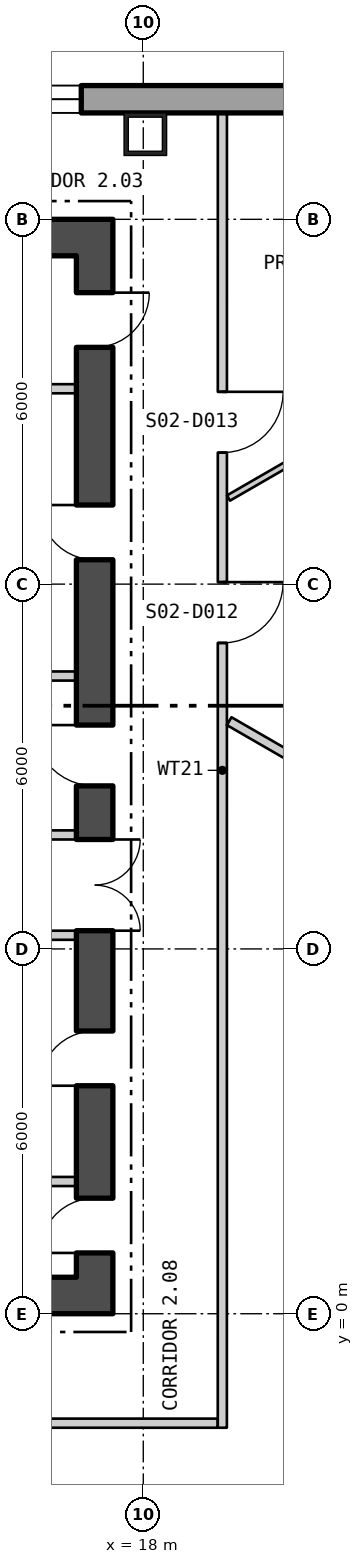
"""IFC4 building model, lengths in metres.
Left out: names, types, materials, properties, quantities, classifications, styles, units other than length and angle.
Written with IfcOpenShell. Run it as: python <this file> out.ifc"""

import sys

from ifc_helpers import new_model, si_unit, direction, frame, frame_2d, origin, origin_2d, place, context, subcontext, project, spatial, polyline, rectangle, hollow_rectangle, outline, extrude, element, fill, save


model = new_model("IFC4")
c1 = context("Model", 3, precision=1e-05, world=origin(), true_north=direction((0.0, 1.0)))
c2 = subcontext(c1, "Body", "Model", "MODEL_VIEW")
j1 = project(units=[si_unit("LENGTHUNIT", "METRE"), si_unit("PLANEANGLEUNIT", "RADIAN")], contexts=[c1])
p1 = place(None, origin())
s1 = spatial("IfcSite", under=j1, at=p1, CompositionType="ELEMENT")
p2 = place(p1, origin())
s2 = spatial("IfcBuilding", under=s1, at=p2, CompositionType="ELEMENT")
p3 = place(p2, frame((0.0, 0.0, 33.3)))
s3 = spatial("IfcBuildingStorey", under=s2, at=p3, CompositionType="ELEMENT", Elevation=33.3)
p4 = place(p3, frame((18.034, 19.4, 0.0), z_axis=(0.0, 0.0, 1.0), x_axis=(-1.0, 0.0, 0.0)))
e1 = element("IfcColumn", 1, at=p4, inside=s3, PredefinedType="COLUMN", context=c2, shape_type="SweptSolid", body=[
    extrude(hollow_rectangle(XDim=0.7, YDim=0.7, WallThickness=0.07, at=origin_2d()), origin(), (0.0, 0.0, 1.0), 4.5),
])
p5 = place(p3, frame((22.875, 19.975, -0.4), z_axis=(0.0, 0.0, 1.0), x_axis=(-1.0, 0.0, 0.0)))
e2 = element("IfcWall", 2, at=p5, inside=s3, PredefinedType="SOLIDWALL", context=c2, shape_type="SweptSolid", body=[
    extrude(outline(polyline([(-0.13, -0.225), (45.88, -0.225), (45.62, 0.225), (0.13, 0.225), (-0.13, -0.225)])), origin(), (0.0, 0.0, 1.0), 4.5),
])
p6 = place(p5, frame((5.895, 0.0, 1.3)))
e3 = element("IfcOpeningElement", 3, at=p6, cuts=e2, PredefinedType="OPENING", context=c2, shape_type="SweptSolid", body=[
    extrude(rectangle(XDim=2.4, YDim=2.6, at=frame_2d((1.2, 1.3))), frame((0.0, 0.235, 0.0), z_axis=(0.0, -1.0, 0.0), x_axis=(1.0, 0.0, 0.0)), (0.0, 0.0, 1.0), 0.47),
])
p7 = place(p5, frame((10.403, 0.0, 1.3)))
e4 = element("IfcOpeningElement", 4, at=p7, cuts=e2, PredefinedType="OPENING", context=c2, shape_type="SweptSolid", body=[
    extrude(rectangle(XDim=2.4, YDim=2.6, at=frame_2d((1.2, 1.3))), frame((0.0, 0.235, 0.0), z_axis=(0.0, -1.0, 0.0), x_axis=(1.0, 0.0, 0.0)), (0.0, 0.0, 1.0), 0.47),
])
p8 = place(p5, frame((14.912, 0.0, 1.3)))
e5 = element("IfcOpeningElement", 5, at=p8, cuts=e2, PredefinedType="OPENING", context=c2, shape_type="SweptSolid", body=[
    extrude(rectangle(XDim=2.4, YDim=2.6, at=frame_2d((1.2, 1.3))), frame((0.0, 0.235, 0.0), z_axis=(0.0, -1.0, 0.0), x_axis=(1.0, 0.0, 0.0)), (0.0, 0.0, 1.0), 0.47),
])
p9 = place(p5, frame((19.421, 0.0, 1.3)))
e6 = element("IfcOpeningElement", 6, at=p9, cuts=e2, PredefinedType="OPENING", context=c2, shape_type="SweptSolid", body=[
    extrude(rectangle(XDim=2.4, YDim=2.6, at=frame_2d((1.2, 1.3))), frame((0.0, 0.235, 0.0), z_axis=(0.0, -1.0, 0.0), x_axis=(1.0, 0.0, 0.0)), (0.0, 0.0, 1.0), 0.47),
])
p10 = place(p5, frame((23.929, 0.0, 1.3)))
e7 = element("IfcOpeningElement", 7, at=p10, cuts=e2, PredefinedType="OPENING", context=c2, shape_type="SweptSolid", body=[
    extrude(rectangle(XDim=2.4, YDim=2.6, at=frame_2d((1.2, 1.3))), frame((0.0, 0.235, 0.0), z_axis=(0.0, -1.0, 0.0), x_axis=(1.0, 0.0, 0.0)), (0.0, 0.0, 1.0), 0.47),
])
p11 = place(p5, frame((28.438, 0.0, 1.3)))
e8 = element("IfcOpeningElement", 8, at=p11, cuts=e2, PredefinedType="OPENING", context=c2, shape_type="SweptSolid", body=[
    extrude(rectangle(XDim=2.4, YDim=2.6, at=frame_2d((1.2, 1.3))), frame((0.0, 0.235, 0.0), z_axis=(0.0, -1.0, 0.0), x_axis=(1.0, 0.0, 0.0)), (0.0, 0.0, 1.0), 0.47),
])
p12 = place(p5, frame((32.947, 0.0, 1.3)))
e9 = element("IfcOpeningElement", 9, at=p12, cuts=e2, PredefinedType="OPENING", context=c2, shape_type="SweptSolid", body=[
    extrude(rectangle(XDim=2.4, YDim=2.6, at=frame_2d((1.2, 1.3))), frame((0.0, 0.235, 0.0), z_axis=(0.0, -1.0, 0.0), x_axis=(1.0, 0.0, 0.0)), (0.0, 0.0, 1.0), 0.47),
])
p13 = place(p5, frame((37.455, 0.0, 1.3)))
e10 = element("IfcOpeningElement", 10, at=p13, cuts=e2, PredefinedType="OPENING", context=c2, shape_type="SweptSolid", body=[
    extrude(rectangle(XDim=2.4, YDim=2.6, at=frame_2d((1.2, 1.3))), frame((0.0, 0.235, 0.0), z_axis=(0.0, -1.0, 0.0), x_axis=(1.0, 0.0, 0.0)), (0.0, 0.0, 1.0), 0.47),
])
p14 = place(p3, frame((5.75, -29.605, -0.18), z_axis=(0.0, 0.0, 1.0), x_axis=(0.500000335318, 0.866025210188, 0.0)))
e11 = element("IfcWall", 11, at=p14, inside=s3, PredefinedType="SOLIDWALL", context=c2, shape_type="SweptSolid", body=[
    extrude(outline(polyline([(-0.13, -0.225), (45.88, -0.225), (45.62, 0.225), (0.13, 0.225), (-0.13, -0.225)])), origin(), (0.0, 0.0, 1.0), 4.28),
])
p15 = place(p14, frame((1.425, 0.0, 1.08)))
e12 = element("IfcOpeningElement", 12, at=p15, cuts=e11, PredefinedType="OPENING", context=c2, shape_type="SweptSolid", body=[
    extrude(rectangle(XDim=2.4, YDim=2.6, at=frame_2d((1.2, 1.3))), frame((0.0, 0.235, 0.0), z_axis=(0.0, -1.0, 0.0), x_axis=(1.0, 0.0, 0.0)), (0.0, 0.0, 1.0), 0.47),
])
p16 = place(p14, frame((5.895, 0.0, 1.08)))
e13 = element("IfcOpeningElement", 13, at=p16, cuts=e11, PredefinedType="OPENING", context=c2, shape_type="SweptSolid", body=[
    extrude(rectangle(XDim=2.4, YDim=2.6, at=frame_2d((1.2, 1.3))), frame((0.0, 0.235, 0.0), z_axis=(0.0, -1.0, 0.0), x_axis=(1.0, 0.0, 0.0)), (0.0, 0.0, 1.0), 0.47),
])
p17 = place(p14, frame((10.403, 0.0, 1.08)))
e14 = element("IfcOpeningElement", 14, at=p17, cuts=e11, PredefinedType="OPENING", context=c2, shape_type="SweptSolid", body=[
    extrude(rectangle(XDim=2.4, YDim=2.6, at=frame_2d((1.2, 1.3))), frame((0.0, 0.235, 0.0), z_axis=(0.0, -1.0, 0.0), x_axis=(1.0, 0.0, 0.0)), (0.0, 0.0, 1.0), 0.47),
])
p18 = place(p14, frame((14.912, 0.0, 1.08)))
e15 = element("IfcOpeningElement", 15, at=p18, cuts=e11, PredefinedType="OPENING", context=c2, shape_type="SweptSolid", body=[
    extrude(rectangle(XDim=2.4, YDim=2.6, at=frame_2d((1.2, 1.3))), frame((0.0, 0.235, 0.0), z_axis=(0.0, -1.0, 0.0), x_axis=(1.0, 0.0, 0.0)), (0.0, 0.0, 1.0), 0.47),
])
p19 = place(p14, frame((19.421, 0.0, 1.08)))
e16 = element("IfcOpeningElement", 16, at=p19, cuts=e11, PredefinedType="OPENING", context=c2, shape_type="SweptSolid", body=[
    extrude(rectangle(XDim=2.4, YDim=2.6, at=frame_2d((1.2, 1.3))), frame((0.0, 0.235, 0.0), z_axis=(0.0, -1.0, 0.0), x_axis=(1.0, 0.0, 0.0)), (0.0, 0.0, 1.0), 0.47),
])
p20 = place(p14, frame((23.929, 0.0, 1.08)))
e17 = element("IfcOpeningElement", 17, at=p20, cuts=e11, PredefinedType="OPENING", context=c2, shape_type="SweptSolid", body=[
    extrude(rectangle(XDim=2.4, YDim=2.6, at=frame_2d((1.2, 1.3))), frame((0.0, 0.235, 0.0), z_axis=(0.0, -1.0, 0.0), x_axis=(1.0, 0.0, 0.0)), (0.0, 0.0, 1.0), 0.47),
])
p21 = place(p14, frame((28.438, 0.0, 1.08)))
e18 = element("IfcOpeningElement", 18, at=p21, cuts=e11, PredefinedType="OPENING", context=c2, shape_type="SweptSolid", body=[
    extrude(rectangle(XDim=2.4, YDim=2.6, at=frame_2d((1.2, 1.3))), frame((0.0, 0.235, 0.0), z_axis=(0.0, -1.0, 0.0), x_axis=(1.0, 0.0, 0.0)), (0.0, 0.0, 1.0), 0.47),
])
p22 = place(p14, frame((32.947, 0.0, 1.08)))
e19 = element("IfcOpeningElement", 19, at=p22, cuts=e11, PredefinedType="OPENING", context=c2, shape_type="SweptSolid", body=[
    extrude(rectangle(XDim=2.4, YDim=2.6, at=frame_2d((1.2, 1.3))), frame((0.0, 0.235, 0.0), z_axis=(0.0, -1.0, 0.0), x_axis=(1.0, 0.0, 0.0)), (0.0, 0.0, 1.0), 0.47),
])
p23 = place(p14, frame((37.455, 0.0, 1.08)))
e20 = element("IfcOpeningElement", 20, at=p23, cuts=e11, PredefinedType="OPENING", context=c2, shape_type="SweptSolid", body=[
    extrude(rectangle(XDim=2.4, YDim=2.6, at=frame_2d((1.2, 1.3))), frame((0.0, 0.235, 0.0), z_axis=(0.0, -1.0, 0.0), x_axis=(1.0, 0.0, 0.0)), (0.0, 0.0, 1.0), 0.47),
])
p24 = place(p14, frame((41.925, 0.0, 1.08)))
e21 = element("IfcOpeningElement", 21, at=p24, cuts=e11, PredefinedType="OPENING", context=c2, shape_type="SweptSolid", body=[
    extrude(rectangle(XDim=2.4, YDim=2.6, at=frame_2d((1.2, 1.3))), frame((0.0, 0.235, 0.0), z_axis=(0.0, -1.0, 0.0), x_axis=(1.0, 0.0, 0.0)), (0.0, 0.0, 1.0), 0.47),
])
p25 = place(p3, frame((-17.5, 0.3, 0.0), z_axis=(0.0, 0.0, 1.0), x_axis=(1.0, 0.0, 0.0)))
e22 = element("IfcWall", 22, at=p25, inside=s3, PredefinedType="SHEAR", context=c2, shape_type="SweptSolid", body=[
    extrude(rectangle(XDim=35.0, YDim=0.6, at=frame_2d((17.5, 0.0))), origin(), (0.0, 0.0, 1.0), 4.3),
])
p26 = place(p25, frame((12.0, 0.0, 0.0)))
e23 = element("IfcOpeningElement", 23, at=p26, cuts=e22, PredefinedType="OPENING", context=c2, shape_type="SweptSolid", body=[
    extrude(rectangle(XDim=1.8, YDim=2.4, at=frame_2d((0.9, 1.2))), frame((0.0, 0.31, 0.0), z_axis=(0.0, -1.0, 0.0), x_axis=(1.0, 0.0, 0.0)), (0.0, 0.0, 1.0), 0.62),
])
p27 = place(p25, frame((22.0, 0.0, 0.0)))
e24 = element("IfcOpeningElement", 24, at=p27, cuts=e22, PredefinedType="OPENING", context=c2, shape_type="SweptSolid", body=[
    extrude(rectangle(XDim=1.8, YDim=2.4, at=frame_2d((0.9, 1.2))), frame((0.0, 0.31, 0.0), z_axis=(0.0, -1.0, 0.0), x_axis=(1.0, 0.0, 0.0)), (0.0, 0.0, 1.0), 0.62),
])
p28 = place(p3, frame((-17.5, 17.7, 0.0), z_axis=(0.0, 0.0, 1.0), x_axis=(1.0, 0.0, 0.0)))
e25 = element("IfcWall", 25, at=p28, inside=s3, PredefinedType="SHEAR", context=c2, shape_type="SweptSolid", body=[
    extrude(rectangle(XDim=35.0, YDim=0.6, at=frame_2d((17.5, 0.0))), origin(), (0.0, 0.0, 1.0), 4.3),
])
p29 = place(p3, frame((17.2, 0.6, 0.0), z_axis=(0.0, 0.0, 1.0), x_axis=(0.0, 1.0, 0.0)))
e26 = element("IfcWall", 26, at=p29, inside=s3, PredefinedType="SHEAR", context=c2, shape_type="SweptSolid", body=[
    extrude(rectangle(XDim=16.8, YDim=0.6, at=frame_2d((8.4, 0.0))), origin(), (0.0, 0.0, 1.0), 4.3),
])
p30 = place(p29, frame((5.7, 0.0, 0.0)))
e27 = element("IfcOpeningElement", 27, at=p30, cuts=e26, PredefinedType="OPENING", context=c2, shape_type="SweptSolid", body=[
    extrude(rectangle(XDim=1.5, YDim=2.1, at=frame_2d((0.75, 1.05))), frame((0.0, 0.31, 0.0), z_axis=(0.0, -1.0, 0.0), x_axis=(1.0, 0.0, 0.0)), (0.0, 0.0, 1.0), 0.62),
])
p31 = place(p29, frame((0.4, 0.0, 0.0)))
e28 = element("IfcOpeningElement", 28, at=p31, cuts=e26, PredefinedType="OPENING", context=c2, shape_type="SweptSolid", body=[
    extrude(rectangle(XDim=0.9, YDim=2.1, at=frame_2d((0.45, 1.05))), frame((0.0, 0.31, 0.0), z_axis=(0.0, -1.0, 0.0), x_axis=(1.0, 0.0, 0.0)), (0.0, 0.0, 1.0), 0.62),
])
p32 = place(p29, frame((3.15, 0.0, 0.0)))
e29 = element("IfcOpeningElement", 29, at=p32, cuts=e26, PredefinedType="OPENING", context=c2, shape_type="SweptSolid", body=[
    extrude(rectangle(XDim=0.9, YDim=2.1, at=frame_2d((0.45, 1.05))), frame((0.0, 0.31, 0.0), z_axis=(0.0, -1.0, 0.0), x_axis=(1.0, 0.0, 0.0)), (0.0, 0.0, 1.0), 0.62),
])
p33 = place(p29, frame((8.082, 0.0, 0.0)))
e30 = element("IfcOpeningElement", 30, at=p33, cuts=e26, PredefinedType="OPENING", context=c2, shape_type="SweptSolid", body=[
    extrude(rectangle(XDim=1.0, YDim=2.1, at=frame_2d((0.5, 1.05))), frame((0.0, 0.31, 0.0), z_axis=(0.0, -1.0, 0.0), x_axis=(1.0, 0.0, 0.0)), (0.0, 0.0, 1.0), 0.62),
])
p34 = place(p29, frame((11.801, 0.0, 0.0)))
e31 = element("IfcOpeningElement", 31, at=p34, cuts=e26, PredefinedType="OPENING", context=c2, shape_type="SweptSolid", body=[
    extrude(rectangle(XDim=0.9, YDim=2.1, at=frame_2d((0.45, 1.05))), frame((0.0, 0.31, 0.0), z_axis=(0.0, -1.0, 0.0), x_axis=(1.0, 0.0, 0.0)), (0.0, 0.0, 1.0), 0.62),
])
p35 = place(p29, frame((15.294, 0.0, 0.0)))
e32 = element("IfcOpeningElement", 32, at=p35, cuts=e26, PredefinedType="OPENING", context=c2, shape_type="SweptSolid", body=[
    extrude(rectangle(XDim=0.9, YDim=2.1, at=frame_2d((0.45, 1.05))), frame((0.0, 0.31, 0.0), z_axis=(0.0, -1.0, 0.0), x_axis=(1.0, 0.0, 0.0)), (0.0, 0.0, 1.0), 0.62),
])
for number, where, z_axis, x_axis in (
    (33, (14.5, 6.225, 0.0), (0.0, 0.0, 1.0), (1.0, 0.0, 0.0)),
    (34, (14.5, 7.875, 0.0), (0.0, 0.0, 1.0), (1.0, 0.0, 0.0)),
    (35, (14.5, 2.175, 0.0), (0.0, 0.0, 1.0), (1.0, 0.0, 0.0)),
    (36, (14.5, 10.489, 0.0), (0.0, 0.0, 1.0), (1.0, 0.0, 0.0)),
    (37, (14.5, 15.213, 0.0), (0.0, 0.0, 1.0), (1.0, 0.0, 0.0)),
):
    element("IfcWall", number, at=place(p3, frame(where, z_axis=z_axis, x_axis=x_axis)), inside=s3, PredefinedType="PARTITIONING", context=c2, shape_type="SweptSolid", body=[
        extrude(rectangle(XDim=2.4, YDim=0.15, at=frame_2d((1.2, 0.0))), origin(), (0.0, 0.0, 1.0), 4.3),
    ])
p36 = place(p3, frame((8.015, -1.8, 0.0), z_axis=(0.0, 0.0, 1.0), x_axis=(1.0, 0.0, 0.0)))
e38 = element("IfcWall", 38, at=p36, inside=s3, PredefinedType="PARTITIONING", context=c2, shape_type="SweptSolid", body=[
    extrude(rectangle(XDim=11.21, YDim=0.15, at=frame_2d((5.605, 0.0))), origin(), (0.0, 0.0, 1.0), 4.3),
])
p37 = place(p3, frame((19.3, -1.875, 0.0), z_axis=(0.0, 0.0, 1.0), x_axis=(4.6242775e-05, 0.999999998931, 0.0)))
e39 = element("IfcWall", 39, at=p37, inside=s3, PredefinedType="PARTITIONING", context=c2, shape_type="SweptSolid", body=[
    extrude(rectangle(XDim=21.625, YDim=0.15, at=frame_2d((10.812, 0.0))), origin(), (0.0, 0.0, 1.0), 4.3),
])
p38 = place(p37, frame((12.908, 0.0, 0.0)))
e40 = element("IfcOpeningElement", 40, at=p38, cuts=e39, PredefinedType="OPENING", context=c2, shape_type="SweptSolid", body=[
    extrude(rectangle(XDim=1.0, YDim=2.1, at=frame_2d((0.5, 1.05))), frame((0.0, 0.085, 0.0), z_axis=(0.0, -1.0, 0.0), x_axis=(1.0, 0.0, 0.0)), (0.0, 0.0, 1.0), 0.17),
])
p39 = place(p37, frame((16.038, 0.0, 0.0)))
e41 = element("IfcOpeningElement", 41, at=p39, cuts=e39, PredefinedType="OPENING", context=c2, shape_type="SweptSolid", body=[
    extrude(rectangle(XDim=1.0, YDim=2.1, at=frame_2d((0.5, 1.05))), frame((0.0, 0.085, 0.0), z_axis=(0.0, -1.0, 0.0), x_axis=(1.0, 0.0, 0.0)), (0.0, 0.0, 1.0), 0.17),
])
p40 = place(p3, frame((19.401, 13.416, 0.0), z_axis=(0.0, 0.0, 1.0), x_axis=(0.866108468144, 0.499856100702, 0.0)))
e42 = element("IfcWall", 42, at=p40, inside=s3, PredefinedType="PARTITIONING", context=c2, shape_type="SweptSolid", body=[
    extrude(rectangle(XDim=5.614, YDim=0.1, at=frame_2d((2.807, 0.0))), origin(), (0.0, 0.0, 1.0), 4.3),
])
p41 = place(p3, frame((19.413, 9.746, 0.0), z_axis=(0.0, 0.0, 1.0), x_axis=(0.865976502062, -0.500084690704, 0.0)))
e43 = element("IfcWall", 43, at=p41, inside=s3, PredefinedType="PARTITIONING", context=c2, shape_type="SweptSolid", body=[
    extrude(rectangle(XDim=7.169, YDim=0.15, at=frame_2d((3.584, 0.0))), origin(), (0.0, 0.0, 1.0), 4.3),
])
p42 = place(p6, origin())
e44 = element("IfcWindow", 44, at=p42, inside=s3, PartitioningType="SINGLE_PANEL", PredefinedType="WINDOW", context=c2, shape_type="SweptSolid", body=[
    extrude(rectangle(XDim=2.4, YDim=2.6, at=frame_2d((1.2, 1.3))), frame((0.0, 0.105, 0.0), z_axis=(0.0, -1.0, 0.0), x_axis=(1.0, 0.0, 0.0)), (0.0, 0.0, 1.0), 0.06),
])
fill(e3, e44)
p43 = place(p30, origin())
e45 = element("IfcDoor", 45, at=p43, inside=s3, OperationType="DOUBLE_DOOR_SINGLE_SWING", PredefinedType="DOOR", context=c2, shape_type="SweptSolid", body=[
    extrude(rectangle(XDim=1.5, YDim=2.1, at=frame_2d((0.75, 1.05))), frame((0.0, 0.025, 0.0), z_axis=(0.0, -1.0, 0.0), x_axis=(1.0, 0.0, 0.0)), (0.0, 0.0, 1.0), 0.05),
])
fill(e27, e45)
p44 = place(p31, origin())
e46 = element("IfcDoor", 46, at=p44, inside=s3, OperationType="SINGLE_SWING_RIGHT", PredefinedType="DOOR", context=c2, shape_type="SweptSolid", body=[
    extrude(rectangle(XDim=0.9, YDim=2.1, at=frame_2d((0.45, 1.05))), frame((0.0, 0.025, 0.0), z_axis=(0.0, -1.0, 0.0), x_axis=(1.0, 0.0, 0.0)), (0.0, 0.0, 1.0), 0.05),
])
fill(e28, e46)
p45 = place(p32, origin())
e47 = element("IfcDoor", 47, at=p45, inside=s3, OperationType="SINGLE_SWING_RIGHT", PredefinedType="DOOR", context=c2, shape_type="SweptSolid", body=[
    extrude(rectangle(XDim=0.9, YDim=2.1, at=frame_2d((0.45, 1.05))), frame((0.0, 0.025, 0.0), z_axis=(0.0, -1.0, 0.0), x_axis=(1.0, 0.0, 0.0)), (0.0, 0.0, 1.0), 0.05),
])
fill(e29, e47)
p46 = place(p33, origin())
e48 = element("IfcDoor", 48, at=p46, inside=s3, OperationType="SINGLE_SWING_LEFT", PredefinedType="DOOR", context=c2, shape_type="SweptSolid", body=[
    extrude(rectangle(XDim=1.0, YDim=2.1, at=frame_2d((0.5, 1.05))), frame((0.0, 0.025, 0.0), z_axis=(0.0, -1.0, 0.0), x_axis=(1.0, 0.0, 0.0)), (0.0, 0.0, 1.0), 0.05),
])
fill(e30, e48)
p47 = place(p34, origin())
e49 = element("IfcDoor", 49, at=p47, inside=s3, OperationType="SINGLE_SWING_LEFT", PredefinedType="DOOR", context=c2, shape_type="SweptSolid", body=[
    extrude(rectangle(XDim=0.9, YDim=2.1, at=frame_2d((0.45, 1.05))), frame((0.0, 0.025, 0.0), z_axis=(0.0, -1.0, 0.0), x_axis=(1.0, 0.0, 0.0)), (0.0, 0.0, 1.0), 0.05),
])
fill(e31, e49)
p48 = place(p35, origin())
e50 = element("IfcDoor", 50, at=p48, inside=s3, OperationType="SINGLE_SWING_RIGHT", PredefinedType="DOOR", context=c2, shape_type="SweptSolid", body=[
    extrude(rectangle(XDim=0.9, YDim=2.1, at=frame_2d((0.45, 1.05))), frame((0.0, 0.025, 0.0), z_axis=(0.0, -1.0, 0.0), x_axis=(1.0, 0.0, 0.0)), (0.0, 0.0, 1.0), 0.05),
])
fill(e32, e50)
p49 = place(p38, origin())
e51 = element("IfcDoor", 51, at=p49, inside=s3, OperationType="SINGLE_SWING_RIGHT", PredefinedType="DOOR", context=c2, shape_type="SweptSolid", body=[
    extrude(rectangle(XDim=1.0, YDim=2.1, at=frame_2d((0.5, 1.05))), frame((0.0, 0.025, 0.0), z_axis=(0.0, -1.0, 0.0), x_axis=(1.0, 0.0, 0.0)), (0.0, 0.0, 1.0), 0.05),
])
fill(e40, e51)
p50 = place(p39, origin())
e52 = element("IfcDoor", 52, at=p50, inside=s3, OperationType="SINGLE_SWING_RIGHT", PredefinedType="DOOR", context=c2, shape_type="SweptSolid", body=[
    extrude(rectangle(XDim=1.0, YDim=2.1, at=frame_2d((0.5, 1.05))), frame((0.0, 0.025, 0.0), z_axis=(0.0, -1.0, 0.0), x_axis=(1.0, 0.0, 0.0)), (0.0, 0.0, 1.0), 0.05),
])
fill(e41, e52)
save(model, sys.argv[1])
